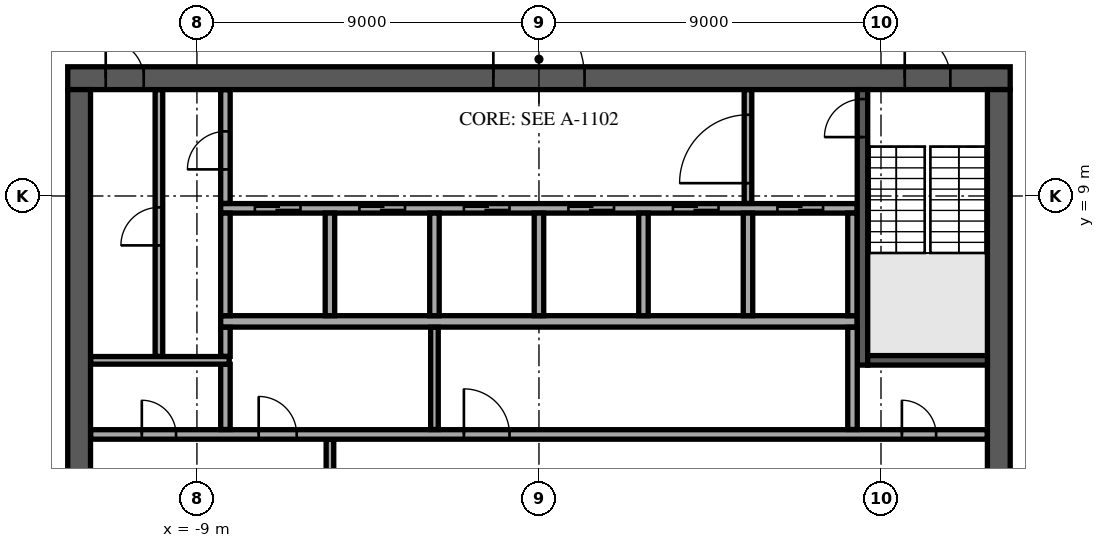
"""IFC4 building model, lengths in metres.
Left out: names, types, materials, properties, quantities, classifications, styles, units other than length and angle.
Written with IfcOpenShell. Run it as: python <this file> out.ifc"""

import sys

from ifc_helpers import new_model, si_unit, direction, frame, frame_2d, origin, place, context, subcontext, project, spatial, rectangle, extrude, element, fill, save


model = new_model("IFC4")
c1 = context("Model", 3, precision=1e-05, world=origin(), true_north=direction((0.0, 1.0)))
c2 = subcontext(c1, "Body", "Model", "MODEL_VIEW")
j1 = project(units=[si_unit("LENGTHUNIT", "METRE"), si_unit("PLANEANGLEUNIT", "RADIAN")], contexts=[c1])
p1 = place(None, origin())
s1 = spatial("IfcSite", under=j1, at=p1, CompositionType="ELEMENT")
p2 = place(p1, origin())
s2 = spatial("IfcBuilding", under=s1, at=p2, CompositionType="ELEMENT")
p3 = place(p2, frame((0.0, 0.0, 296.5)))
s3 = spatial("IfcBuildingStorey", under=s2, at=p3, CompositionType="ELEMENT", Elevation=296.5)
p4 = place(p3, frame((-12.4, 12.1, 0.0), z_axis=(0.0, 0.0, 1.0), x_axis=(1.0, 0.0, 0.0)))
e1 = element("IfcWall", 1, at=p4, inside=s3, PredefinedType="SHEAR", context=c2, shape_type="SweptSolid", body=[
    extrude(rectangle(XDim=24.8, YDim=0.6, at=frame_2d((12.4, 0.0))), origin(), (0.0, 0.0, 1.0), 3.65),
])
p5 = place(p4, frame((11.2, 0.0, 0.0)))
e2 = element("IfcOpeningElement", 2, at=p5, cuts=e1, PredefinedType="OPENING", context=c2, shape_type="SweptSolid", body=[
    extrude(rectangle(XDim=2.4, YDim=2.4, at=frame_2d((1.2, 1.2))), frame((0.0, 0.31, 0.0), z_axis=(0.0, -1.0, 0.0), x_axis=(1.0, 0.0, 0.0)), (0.0, 0.0, 1.0), 0.62),
])
p6 = place(p4, frame((22.025, 0.0, 0.0)))
e3 = element("IfcOpeningElement", 3, at=p6, cuts=e1, PredefinedType="OPENING", context=c2, shape_type="SweptSolid", body=[
    extrude(rectangle(XDim=1.2, YDim=2.1, at=frame_2d((0.6, 1.05))), frame((0.0, 0.31, 0.0), z_axis=(0.0, -1.0, 0.0), x_axis=(1.0, 0.0, 0.0)), (0.0, 0.0, 1.0), 0.62),
])
p7 = place(p4, frame((1.0, 0.0, 0.0)))
e4 = element("IfcOpeningElement", 4, at=p7, cuts=e1, PredefinedType="OPENING", context=c2, shape_type="SweptSolid", body=[
    extrude(rectangle(XDim=1.0, YDim=2.1, at=frame_2d((0.5, 1.05))), frame((0.0, 0.31, 0.0), z_axis=(0.0, -1.0, 0.0), x_axis=(1.0, 0.0, 0.0)), (0.0, 0.0, 1.0), 0.62),
])
p8 = place(p3, frame((12.1, -11.8, 0.0), z_axis=(0.0, 0.0, 1.0), x_axis=(0.0, 1.0, 0.0)))
e5 = element("IfcWall", 5, at=p8, inside=s3, PredefinedType="SHEAR", context=c2, shape_type="SweptSolid", body=[
    extrude(rectangle(XDim=23.6, YDim=0.6, at=frame_2d((11.8, 0.0))), origin(), (0.0, 0.0, 1.0), 3.65),
])
p9 = place(p8, frame((10.6, 0.0, 0.0)))
e6 = element("IfcOpeningElement", 6, at=p9, cuts=e5, PredefinedType="OPENING", context=c2, shape_type="SweptSolid", body=[
    extrude(rectangle(XDim=2.4, YDim=2.4, at=frame_2d((1.2, 1.2))), frame((0.0, 0.31, 0.0), z_axis=(0.0, -1.0, 0.0), x_axis=(1.0, 0.0, 0.0)), (0.0, 0.0, 1.0), 0.62),
])
p10 = place(p3, frame((-12.1, -11.8, 0.0), z_axis=(0.0, 0.0, 1.0), x_axis=(0.0, 1.0, 0.0)))
e7 = element("IfcWall", 7, at=p10, inside=s3, PredefinedType="SHEAR", context=c2, shape_type="SweptSolid", body=[
    extrude(rectangle(XDim=23.6, YDim=0.6, at=frame_2d((11.8, 0.0))), origin(), (0.0, 0.0, 1.0), 3.65),
])
p11 = place(p10, frame((10.6, 0.0, 0.0)))
e8 = element("IfcOpeningElement", 8, at=p11, cuts=e7, PredefinedType="OPENING", context=c2, shape_type="SweptSolid", body=[
    extrude(rectangle(XDim=2.4, YDim=2.4, at=frame_2d((1.2, 1.2))), frame((0.0, 0.31, 0.0), z_axis=(0.0, -1.0, 0.0), x_axis=(1.0, 0.0, 0.0)), (0.0, 0.0, 1.0), 0.62),
])
p12 = place(p3, frame((-8.375, 5.7, 0.0), z_axis=(0.0, 0.0, 1.0), x_axis=(1.0, 0.0, 0.0)))
e9 = element("IfcWall", 9, at=p12, inside=s3, PredefinedType="SOLIDWALL", context=c2, shape_type="SweptSolid", body=[
    extrude(rectangle(XDim=16.75, YDim=0.3, at=frame_2d((8.375, 0.0))), origin(), (0.0, 0.0, 1.0), 3.65),
])
p13 = place(p3, frame((-8.375, 8.675, 0.0), z_axis=(0.0, 0.0, 1.0), x_axis=(1.0, 0.0, 0.0)))
e10 = element("IfcWall", 10, at=p13, inside=s3, PredefinedType="SOLIDWALL", context=c2, shape_type="SweptSolid", body=[
    extrude(rectangle(XDim=16.75, YDim=0.25, at=frame_2d((8.375, 0.0))), origin(), (0.0, 0.0, 1.0), 3.65),
])
p14 = place(p13, frame((0.9, 0.0, 0.0)))
e11 = element("IfcOpeningElement", 11, at=p14, cuts=e10, PredefinedType="OPENING", context=c2, shape_type="SweptSolid", body=[
    extrude(rectangle(XDim=1.2, YDim=2.1, at=frame_2d((0.6, 1.05))), frame((0.0, 0.135, 0.0), z_axis=(0.0, -1.0, 0.0), x_axis=(1.0, 0.0, 0.0)), (0.0, 0.0, 1.0), 0.27),
])
p15 = place(p13, frame((3.65, 0.0, 0.0)))
e12 = element("IfcOpeningElement", 12, at=p15, cuts=e10, PredefinedType="OPENING", context=c2, shape_type="SweptSolid", body=[
    extrude(rectangle(XDim=1.2, YDim=2.1, at=frame_2d((0.6, 1.05))), frame((0.0, 0.135, 0.0), z_axis=(0.0, -1.0, 0.0), x_axis=(1.0, 0.0, 0.0)), (0.0, 0.0, 1.0), 0.27),
])
p16 = place(p13, frame((6.4, 0.0, 0.0)))
e13 = element("IfcOpeningElement", 13, at=p16, cuts=e10, PredefinedType="OPENING", context=c2, shape_type="SweptSolid", body=[
    extrude(rectangle(XDim=1.2, YDim=2.1, at=frame_2d((0.6, 1.05))), frame((0.0, 0.135, 0.0), z_axis=(0.0, -1.0, 0.0), x_axis=(1.0, 0.0, 0.0)), (0.0, 0.0, 1.0), 0.27),
])
p17 = place(p13, frame((9.15, 0.0, 0.0)))
e14 = element("IfcOpeningElement", 14, at=p17, cuts=e10, PredefinedType="OPENING", context=c2, shape_type="SweptSolid", body=[
    extrude(rectangle(XDim=1.2, YDim=2.1, at=frame_2d((0.6, 1.05))), frame((0.0, 0.135, 0.0), z_axis=(0.0, -1.0, 0.0), x_axis=(1.0, 0.0, 0.0)), (0.0, 0.0, 1.0), 0.27),
])
p18 = place(p13, frame((11.9, 0.0, 0.0)))
e15 = element("IfcOpeningElement", 15, at=p18, cuts=e10, PredefinedType="OPENING", context=c2, shape_type="SweptSolid", body=[
    extrude(rectangle(XDim=1.2, YDim=2.1, at=frame_2d((0.6, 1.05))), frame((0.0, 0.135, 0.0), z_axis=(0.0, -1.0, 0.0), x_axis=(1.0, 0.0, 0.0)), (0.0, 0.0, 1.0), 0.27),
])
p19 = place(p13, frame((14.65, 0.0, 0.0)))
e16 = element("IfcOpeningElement", 16, at=p19, cuts=e10, PredefinedType="OPENING", context=c2, shape_type="SweptSolid", body=[
    extrude(rectangle(XDim=1.2, YDim=2.1, at=frame_2d((0.6, 1.05))), frame((0.0, 0.135, 0.0), z_axis=(0.0, -1.0, 0.0), x_axis=(1.0, 0.0, 0.0)), (0.0, 0.0, 1.0), 0.27),
])
for number, where, z_axis, x_axis in (
    (17, (-8.25, 5.85, 0.0), (0.0, 0.0, 1.0), (0.0, 1.0, 0.0)),
    (18, (-5.5, 5.85, 0.0), (0.0, 0.0, 1.0), (0.0, 1.0, 0.0)),
    (19, (-2.75, 5.85, 0.0), (0.0, 0.0, 1.0), (0.0, 1.0, 0.0)),
    (20, (0.0, 5.85, 0.0), (0.0, 0.0, 1.0), (0.0, 1.0, 0.0)),
    (21, (2.75, 5.85, 0.0), (0.0, 0.0, 1.0), (0.0, 1.0, 0.0)),
    (22, (5.5, 5.85, 0.0), (0.0, 0.0, 1.0), (0.0, 1.0, 0.0)),
    (23, (8.25, 5.85, 0.0), (0.0, 0.0, 1.0), (0.0, 1.0, 0.0)),
):
    element("IfcWall", number, at=place(p3, frame(where, z_axis=z_axis, x_axis=x_axis)), inside=s3, PredefinedType="SOLIDWALL", context=c2, shape_type="SweptSolid", body=[
        extrude(rectangle(XDim=2.7, YDim=0.25, at=frame_2d((1.35, 0.0))), origin(), (0.0, 0.0, 1.0), 3.65),
    ])
p20 = place(p3, frame((8.512, 4.55, 0.0), z_axis=(0.0, 0.0, 1.0), x_axis=(0.0, 1.0, 0.0)))
e24 = element("IfcWall", 24, at=p20, inside=s3, PredefinedType="SOLIDWALL", context=c2, shape_type="SweptSolid", body=[
    extrude(rectangle(XDim=7.25, YDim=0.275, at=frame_2d((3.625, 0.0))), origin(), (0.0, 0.0, 1.0), 3.65),
])
p21 = place(p20, frame((6.0, 0.0, 0.0)))
e25 = element("IfcOpeningElement", 25, at=p21, cuts=e24, PredefinedType="OPENING", context=c2, shape_type="SweptSolid", body=[
    extrude(rectangle(XDim=1.0, YDim=2.1, at=frame_2d((0.5, 1.05))), frame((0.0, 0.147, 0.0), z_axis=(0.0, -1.0, 0.0), x_axis=(1.0, 0.0, 0.0)), (0.0, 0.0, 1.0), 0.295),
])
p22 = place(p3, frame((8.65, 4.675, 0.0), z_axis=(0.0, 0.0, 1.0), x_axis=(1.0, 0.0, 0.0)))
e26 = element("IfcWall", 26, at=p22, inside=s3, PredefinedType="SOLIDWALL", context=c2, shape_type="SweptSolid", body=[
    extrude(rectangle(XDim=3.15, YDim=0.25, at=frame_2d((1.575, 0.0))), origin(), (0.0, 0.0, 1.0), 3.65),
])
p23 = place(p3, frame((-5.5, -2.595, 0.0), z_axis=(0.0, 0.0, 1.0), x_axis=(0.0, 1.0, 0.0)))
e27 = element("IfcWall", 27, at=p23, inside=s3, PredefinedType="PARTITIONING", context=c2, shape_type="SweptSolid", body=[
    extrude(rectangle(XDim=5.19, YDim=0.2, at=frame_2d((2.595, 0.0))), origin(), (0.0, 0.0, 1.0), 3.65),
])
p24 = place(p23, frame((1.395, 0.0, 0.0)))
e28 = element("IfcOpeningElement", 28, at=p24, cuts=e27, PredefinedType="OPENING", context=c2, shape_type="SweptSolid", body=[
    extrude(rectangle(XDim=2.4, YDim=2.4, at=frame_2d((1.2, 1.2))), frame((0.0, 0.11, 0.0), z_axis=(0.0, -1.0, 0.0), x_axis=(1.0, 0.0, 0.0)), (0.0, 0.0, 1.0), 0.22),
])
p25 = place(p3, frame((-11.795, 2.725, 0.0), z_axis=(0.0, 0.0, 1.0), x_axis=(1.0, 0.0, 0.0)))
e29 = element("IfcWall", 29, at=p25, inside=s3, PredefinedType="PARTITIONING", context=c2, shape_type="SweptSolid", body=[
    extrude(rectangle(XDim=23.59, YDim=0.25, at=frame_2d((11.795, 0.0))), origin(), (0.0, 0.0, 1.0), 3.65),
])
p26 = place(p25, frame((21.345, 0.0, 0.0)))
e30 = element("IfcOpeningElement", 30, at=p26, cuts=e29, PredefinedType="OPENING", context=c2, shape_type="SweptSolid", body=[
    extrude(rectangle(XDim=0.9, YDim=2.1, at=frame_2d((0.45, 1.05))), frame((0.0, 0.135, 0.0), z_axis=(0.0, -1.0, 0.0), x_axis=(1.0, 0.0, 0.0)), (0.0, 0.0, 1.0), 0.27),
])
p27 = place(p25, frame((1.345, 0.0, 0.0)))
e31 = element("IfcOpeningElement", 31, at=p27, cuts=e29, PredefinedType="OPENING", context=c2, shape_type="SweptSolid", body=[
    extrude(rectangle(XDim=0.9, YDim=2.1, at=frame_2d((0.45, 1.05))), frame((0.0, 0.135, 0.0), z_axis=(0.0, -1.0, 0.0), x_axis=(1.0, 0.0, 0.0)), (0.0, 0.0, 1.0), 0.27),
])
p28 = place(p25, frame((4.42, 0.0, 0.0)))
e32 = element("IfcOpeningElement", 32, at=p28, cuts=e29, PredefinedType="OPENING", context=c2, shape_type="SweptSolid", body=[
    extrude(rectangle(XDim=1.0, YDim=2.1, at=frame_2d((0.5, 1.05))), frame((0.0, 0.135, 0.0), z_axis=(0.0, -1.0, 0.0), x_axis=(1.0, 0.0, 0.0)), (0.0, 0.0, 1.0), 0.27),
])
p29 = place(p25, frame((9.82, 0.0, 0.0)))
e33 = element("IfcOpeningElement", 33, at=p29, cuts=e29, PredefinedType="OPENING", context=c2, shape_type="SweptSolid", body=[
    extrude(rectangle(XDim=1.2, YDim=2.1, at=frame_2d((0.6, 1.05))), frame((0.0, 0.135, 0.0), z_axis=(0.0, -1.0, 0.0), x_axis=(1.0, 0.0, 0.0)), (0.0, 0.0, 1.0), 0.27),
])
p30 = place(p3, frame((-8.25, 2.855, 0.0), z_axis=(0.0, 0.0, 1.0), x_axis=(0.0, 1.0, 0.0)))
e34 = element("IfcWall", 34, at=p30, inside=s3, PredefinedType="PARTITIONING", context=c2, shape_type="SweptSolid", body=[
    extrude(rectangle(XDim=1.715, YDim=0.25, at=frame_2d((0.857, 0.0))), origin(), (0.0, 0.0, 1.0), 3.65),
])
p31 = place(p3, frame((-2.75, 2.855, 0.0), z_axis=(0.0, 0.0, 1.0), x_axis=(0.0, 1.0, 0.0)))
e35 = element("IfcWall", 35, at=p31, inside=s3, PredefinedType="PARTITIONING", context=c2, shape_type="SweptSolid", body=[
    extrude(rectangle(XDim=2.69, YDim=0.2, at=frame_2d((1.345, 0.0))), origin(), (0.0, 0.0, 1.0), 3.65),
])
p32 = place(p3, frame((8.25, 2.855, 0.0), z_axis=(0.0, 0.0, 1.0), x_axis=(0.0, 1.0, 0.0)))
e36 = element("IfcWall", 36, at=p32, inside=s3, PredefinedType="PARTITIONING", context=c2, shape_type="SweptSolid", body=[
    extrude(rectangle(XDim=2.69, YDim=0.25, at=frame_2d((1.345, 0.0))), origin(), (0.0, 0.0, 1.0), 3.65),
])
p33 = place(p3, frame((-11.795, 4.675, 0.0), z_axis=(0.0, 0.0, 1.0), x_axis=(1.0, 0.0, 0.0)))
e37 = element("IfcWall", 37, at=p33, inside=s3, PredefinedType="PARTITIONING", context=c2, shape_type="SweptSolid", body=[
    extrude(rectangle(XDim=3.645, YDim=0.2, at=frame_2d((1.823, 0.0))), origin(), (0.0, 0.0, 1.0), 3.65),
])
p34 = place(p3, frame((-10.0, 4.78, 0.0), z_axis=(0.0, 0.0, 1.0), x_axis=(0.0, 1.0, 0.0)))
e38 = element("IfcWall", 38, at=p34, inside=s3, PredefinedType="PARTITIONING", context=c2, shape_type="SweptSolid", body=[
    extrude(rectangle(XDim=7.015, YDim=0.2, at=frame_2d((3.507, 0.0))), origin(), (0.0, 0.0, 1.0), 3.65),
])
p35 = place(p34, frame((2.92, 0.0, 0.0)))
e39 = element("IfcOpeningElement", 39, at=p35, cuts=e38, PredefinedType="OPENING", context=c2, shape_type="SweptSolid", body=[
    extrude(rectangle(XDim=1.0, YDim=2.1, at=frame_2d((0.5, 1.05))), frame((0.0, 0.11, 0.0), z_axis=(0.0, -1.0, 0.0), x_axis=(1.0, 0.0, 0.0)), (0.0, 0.0, 1.0), 0.22),
])
p36 = place(p3, frame((-8.25, 4.78, 0.0), z_axis=(0.0, 0.0, 1.0), x_axis=(0.0, 1.0, 0.0)))
e40 = element("IfcWall", 40, at=p36, inside=s3, PredefinedType="PARTITIONING", context=c2, shape_type="SweptSolid", body=[
    extrude(rectangle(XDim=0.765, YDim=0.25, at=frame_2d((0.382, 0.0))), origin(), (0.0, 0.0, 1.0), 3.65),
])
p37 = place(p3, frame((-8.25, 8.805, 0.0), z_axis=(0.0, 0.0, 1.0), x_axis=(0.0, 1.0, 0.0)))
e41 = element("IfcWall", 41, at=p37, inside=s3, PredefinedType="PARTITIONING", context=c2, shape_type="SweptSolid", body=[
    extrude(rectangle(XDim=2.99, YDim=0.25, at=frame_2d((1.495, 0.0))), origin(), (0.0, 0.0, 1.0), 3.65),
])
p38 = place(p37, frame((0.895, 0.0, 0.0)))
e42 = element("IfcOpeningElement", 42, at=p38, cuts=e41, PredefinedType="OPENING", context=c2, shape_type="SweptSolid", body=[
    extrude(rectangle(XDim=1.0, YDim=2.1, at=frame_2d((0.5, 1.05))), frame((0.0, 0.135, 0.0), z_axis=(0.0, -1.0, 0.0), x_axis=(1.0, 0.0, 0.0)), (0.0, 0.0, 1.0), 0.27),
])
p39 = place(p3, frame((5.5, 8.805, 0.0), z_axis=(0.0, 0.0, 1.0), x_axis=(0.0, 1.0, 0.0)))
e43 = element("IfcWall", 43, at=p39, inside=s3, PredefinedType="PARTITIONING", context=c2, shape_type="SweptSolid", body=[
    extrude(rectangle(XDim=2.99, YDim=0.2, at=frame_2d((1.495, 0.0))), origin(), (0.0, 0.0, 1.0), 3.65),
])
p40 = place(p39, frame((0.532, 0.0, 0.0)))
e44 = element("IfcOpeningElement", 44, at=p40, cuts=e43, PredefinedType="OPENING", context=c2, shape_type="SweptSolid", body=[
    extrude(rectangle(XDim=1.8, YDim=2.1, at=frame_2d((0.9, 1.05))), frame((0.0, 0.11, 0.0), z_axis=(0.0, -1.0, 0.0), x_axis=(1.0, 0.0, 0.0)), (0.0, 0.0, 1.0), 0.22),
])
p41 = place(p3, frame((-8.176, 25.325, 0.0), z_axis=(0.0, 0.0, 1.0), x_axis=(0.920507643781, -0.390724554821, 0.0)))
e45 = element("IfcWall", 45, at=p41, inside=s3, PredefinedType="PARTITIONING", context=c2, shape_type="SweptSolid", body=[
    extrude(rectangle(XDim=34.917, YDim=0.15, at=frame_2d((17.458, 0.0))), origin(), (0.0, 0.0, 1.0), 3.25),
])
p42 = place(p41, frame((5.55, 0.0, 0.0)))
e46 = element("IfcOpeningElement", 46, at=p42, cuts=e45, PredefinedType="OPENING", context=c2, shape_type="SweptSolid", body=[
    extrude(rectangle(XDim=1.8, YDim=2.1, at=frame_2d((0.9, 1.05))), frame((0.0, 0.085, 0.0), z_axis=(0.0, -1.0, 0.0), x_axis=(1.0, 0.0, 0.0)), (0.0, 0.0, 1.0), 0.17),
])
p43 = place(p41, frame((1.05, 0.0, 0.0)))
e47 = element("IfcOpeningElement", 47, at=p43, cuts=e45, PredefinedType="OPENING", context=c2, shape_type="SweptSolid", body=[
    extrude(rectangle(XDim=1.0, YDim=2.1, at=frame_2d((0.5, 1.05))), frame((0.0, 0.085, 0.0), z_axis=(0.0, -1.0, 0.0), x_axis=(1.0, 0.0, 0.0)), (0.0, 0.0, 1.0), 0.17),
])
p44 = place(p41, frame((16.098, 0.0, 0.0)))
e48 = element("IfcOpeningElement", 48, at=p44, cuts=e45, PredefinedType="OPENING", context=c2, shape_type="SweptSolid", body=[
    extrude(rectangle(XDim=1.0, YDim=2.1, at=frame_2d((0.5, 1.05))), frame((0.0, 0.085, 0.0), z_axis=(0.0, -1.0, 0.0), x_axis=(1.0, 0.0, 0.0)), (0.0, 0.0, 1.0), 0.17),
])
p45 = place(p41, frame((23.547, 0.0, 0.0)))
e49 = element("IfcOpeningElement", 49, at=p45, cuts=e45, PredefinedType="OPENING", context=c2, shape_type="SweptSolid", body=[
    extrude(rectangle(XDim=1.0, YDim=2.1, at=frame_2d((0.5, 1.05))), frame((0.0, 0.085, 0.0), z_axis=(0.0, -1.0, 0.0), x_axis=(1.0, 0.0, 0.0)), (0.0, 0.0, 1.0), 0.17),
])
p46 = place(p5, origin())
e50 = element("IfcDoor", 50, at=p46, inside=s3, OperationType="SINGLE_SWING_LEFT", PredefinedType="DOOR", context=c2, shape_type="SweptSolid", body=[
    extrude(rectangle(XDim=2.4, YDim=2.4, at=frame_2d((1.2, 1.2))), frame((0.0, 0.025, 0.0), z_axis=(0.0, -1.0, 0.0), x_axis=(1.0, 0.0, 0.0)), (0.0, 0.0, 1.0), 0.05),
])
fill(e2, e50)
p47 = place(p6, origin())
e51 = element("IfcDoor", 51, at=p47, inside=s3, OperationType="SINGLE_SWING_LEFT", PredefinedType="DOOR", context=c2, shape_type="SweptSolid", body=[
    extrude(rectangle(XDim=1.2, YDim=2.1, at=frame_2d((0.6, 1.05))), frame((0.0, 0.025, 0.0), z_axis=(0.0, -1.0, 0.0), x_axis=(1.0, 0.0, 0.0)), (0.0, 0.0, 1.0), 0.05),
])
fill(e3, e51)
p48 = place(p7, origin())
e52 = element("IfcDoor", 52, at=p48, inside=s3, OperationType="SINGLE_SWING_LEFT", PredefinedType="DOOR", context=c2, shape_type="SweptSolid", body=[
    extrude(rectangle(XDim=1.0, YDim=2.1, at=frame_2d((0.5, 1.05))), frame((0.0, 0.025, 0.0), z_axis=(0.0, -1.0, 0.0), x_axis=(1.0, 0.0, 0.0)), (0.0, 0.0, 1.0), 0.05),
])
fill(e4, e52)
p49 = place(p14, origin())
e53 = element("IfcDoor", 53, at=p49, inside=s3, OperationType="DOUBLE_DOOR_SLIDING", PredefinedType="DOOR", context=c2, shape_type="SweptSolid", body=[
    extrude(rectangle(XDim=1.2, YDim=2.1, at=frame_2d((0.6, 1.05))), frame((0.0, 0.025, 0.0), z_axis=(0.0, -1.0, 0.0), x_axis=(1.0, 0.0, 0.0)), (0.0, 0.0, 1.0), 0.05),
])
fill(e11, e53)
p50 = place(p15, origin())
e54 = element("IfcDoor", 54, at=p50, inside=s3, OperationType="DOUBLE_DOOR_SLIDING", PredefinedType="DOOR", context=c2, shape_type="SweptSolid", body=[
    extrude(rectangle(XDim=1.2, YDim=2.1, at=frame_2d((0.6, 1.05))), frame((0.0, 0.025, 0.0), z_axis=(0.0, -1.0, 0.0), x_axis=(1.0, 0.0, 0.0)), (0.0, 0.0, 1.0), 0.05),
])
fill(e12, e54)
p51 = place(p16, origin())
e55 = element("IfcDoor", 55, at=p51, inside=s3, OperationType="DOUBLE_DOOR_SLIDING", PredefinedType="DOOR", context=c2, shape_type="SweptSolid", body=[
    extrude(rectangle(XDim=1.2, YDim=2.1, at=frame_2d((0.6, 1.05))), frame((0.0, 0.025, 0.0), z_axis=(0.0, -1.0, 0.0), x_axis=(1.0, 0.0, 0.0)), (0.0, 0.0, 1.0), 0.05),
])
fill(e13, e55)
p52 = place(p17, origin())
e56 = element("IfcDoor", 56, at=p52, inside=s3, OperationType="DOUBLE_DOOR_SLIDING", PredefinedType="DOOR", context=c2, shape_type="SweptSolid", body=[
    extrude(rectangle(XDim=1.2, YDim=2.1, at=frame_2d((0.6, 1.05))), frame((0.0, 0.025, 0.0), z_axis=(0.0, -1.0, 0.0), x_axis=(1.0, 0.0, 0.0)), (0.0, 0.0, 1.0), 0.05),
])
fill(e14, e56)
p53 = place(p18, origin())
e57 = element("IfcDoor", 57, at=p53, inside=s3, OperationType="DOUBLE_DOOR_SLIDING", PredefinedType="DOOR", context=c2, shape_type="SweptSolid", body=[
    extrude(rectangle(XDim=1.2, YDim=2.1, at=frame_2d((0.6, 1.05))), frame((0.0, 0.025, 0.0), z_axis=(0.0, -1.0, 0.0), x_axis=(1.0, 0.0, 0.0)), (0.0, 0.0, 1.0), 0.05),
])
fill(e15, e57)
p54 = place(p19, origin())
e58 = element("IfcDoor", 58, at=p54, inside=s3, OperationType="DOUBLE_DOOR_SLIDING", PredefinedType="DOOR", context=c2, shape_type="SweptSolid", body=[
    extrude(rectangle(XDim=1.2, YDim=2.1, at=frame_2d((0.6, 1.05))), frame((0.0, 0.025, 0.0), z_axis=(0.0, -1.0, 0.0), x_axis=(1.0, 0.0, 0.0)), (0.0, 0.0, 1.0), 0.05),
])
fill(e16, e58)
p55 = place(p21, origin())
e59 = element("IfcDoor", 59, at=p55, inside=s3, OperationType="SINGLE_SWING_LEFT", PredefinedType="DOOR", context=c2, shape_type="SweptSolid", body=[
    extrude(rectangle(XDim=1.0, YDim=2.1, at=frame_2d((0.5, 1.05))), frame((0.0, 0.025, 0.0), z_axis=(0.0, -1.0, 0.0), x_axis=(1.0, 0.0, 0.0)), (0.0, 0.0, 1.0), 0.05),
])
fill(e25, e59)
p56 = place(p26, origin())
e60 = element("IfcDoor", 60, at=p56, inside=s3, OperationType="SINGLE_SWING_LEFT", PredefinedType="DOOR", context=c2, shape_type="SweptSolid", body=[
    extrude(rectangle(XDim=0.9, YDim=2.1, at=frame_2d((0.45, 1.05))), frame((0.0, 0.025, 0.0), z_axis=(0.0, -1.0, 0.0), x_axis=(1.0, 0.0, 0.0)), (0.0, 0.0, 1.0), 0.05),
])
fill(e30, e60)
p57 = place(p27, origin())
e61 = element("IfcDoor", 61, at=p57, inside=s3, OperationType="SINGLE_SWING_LEFT", PredefinedType="DOOR", context=c2, shape_type="SweptSolid", body=[
    extrude(rectangle(XDim=0.9, YDim=2.1, at=frame_2d((0.45, 1.05))), frame((0.0, 0.025, 0.0), z_axis=(0.0, -1.0, 0.0), x_axis=(1.0, 0.0, 0.0)), (0.0, 0.0, 1.0), 0.05),
])
fill(e31, e61)
p58 = place(p35, origin())
e62 = element("IfcDoor", 62, at=p58, inside=s3, OperationType="SINGLE_SWING_LEFT", PredefinedType="DOOR", context=c2, shape_type="SweptSolid", body=[
    extrude(rectangle(XDim=1.0, YDim=2.1, at=frame_2d((0.5, 1.05))), frame((0.0, 0.025, 0.0), z_axis=(0.0, -1.0, 0.0), x_axis=(1.0, 0.0, 0.0)), (0.0, 0.0, 1.0), 0.05),
])
fill(e39, e62)
p59 = place(p38, origin())
e63 = element("IfcDoor", 63, at=p59, inside=s3, OperationType="SINGLE_SWING_LEFT", PredefinedType="DOOR", context=c2, shape_type="SweptSolid", body=[
    extrude(rectangle(XDim=1.0, YDim=2.1, at=frame_2d((0.5, 1.05))), frame((0.0, 0.025, 0.0), z_axis=(0.0, -1.0, 0.0), x_axis=(1.0, 0.0, 0.0)), (0.0, 0.0, 1.0), 0.05),
])
fill(e42, e63)
p60 = place(p28, origin())
e64 = element("IfcDoor", 64, at=p60, inside=s3, OperationType="SINGLE_SWING_LEFT", PredefinedType="DOOR", context=c2, shape_type="SweptSolid", body=[
    extrude(rectangle(XDim=1.0, YDim=2.1, at=frame_2d((0.5, 1.05))), frame((0.0, 0.025, 0.0), z_axis=(0.0, -1.0, 0.0), x_axis=(1.0, 0.0, 0.0)), (0.0, 0.0, 1.0), 0.05),
])
fill(e32, e64)
p61 = place(p29, origin())
e65 = element("IfcDoor", 65, at=p61, inside=s3, OperationType="SINGLE_SWING_LEFT", PredefinedType="DOOR", context=c2, shape_type="SweptSolid", body=[
    extrude(rectangle(XDim=1.2, YDim=2.1, at=frame_2d((0.6, 1.05))), frame((0.0, 0.025, 0.0), z_axis=(0.0, -1.0, 0.0), x_axis=(1.0, 0.0, 0.0)), (0.0, 0.0, 1.0), 0.05),
])
fill(e33, e65)
p62 = place(p40, origin())
e66 = element("IfcDoor", 66, at=p62, inside=s3, OperationType="SINGLE_SWING_LEFT", PredefinedType="DOOR", context=c2, shape_type="SweptSolid", body=[
    extrude(rectangle(XDim=1.8, YDim=2.1, at=frame_2d((0.9, 1.05))), frame((0.0, 0.025, 0.0), z_axis=(0.0, -1.0, 0.0), x_axis=(1.0, 0.0, 0.0)), (0.0, 0.0, 1.0), 0.05),
])
fill(e44, e66)
save(model, sys.argv[1])
